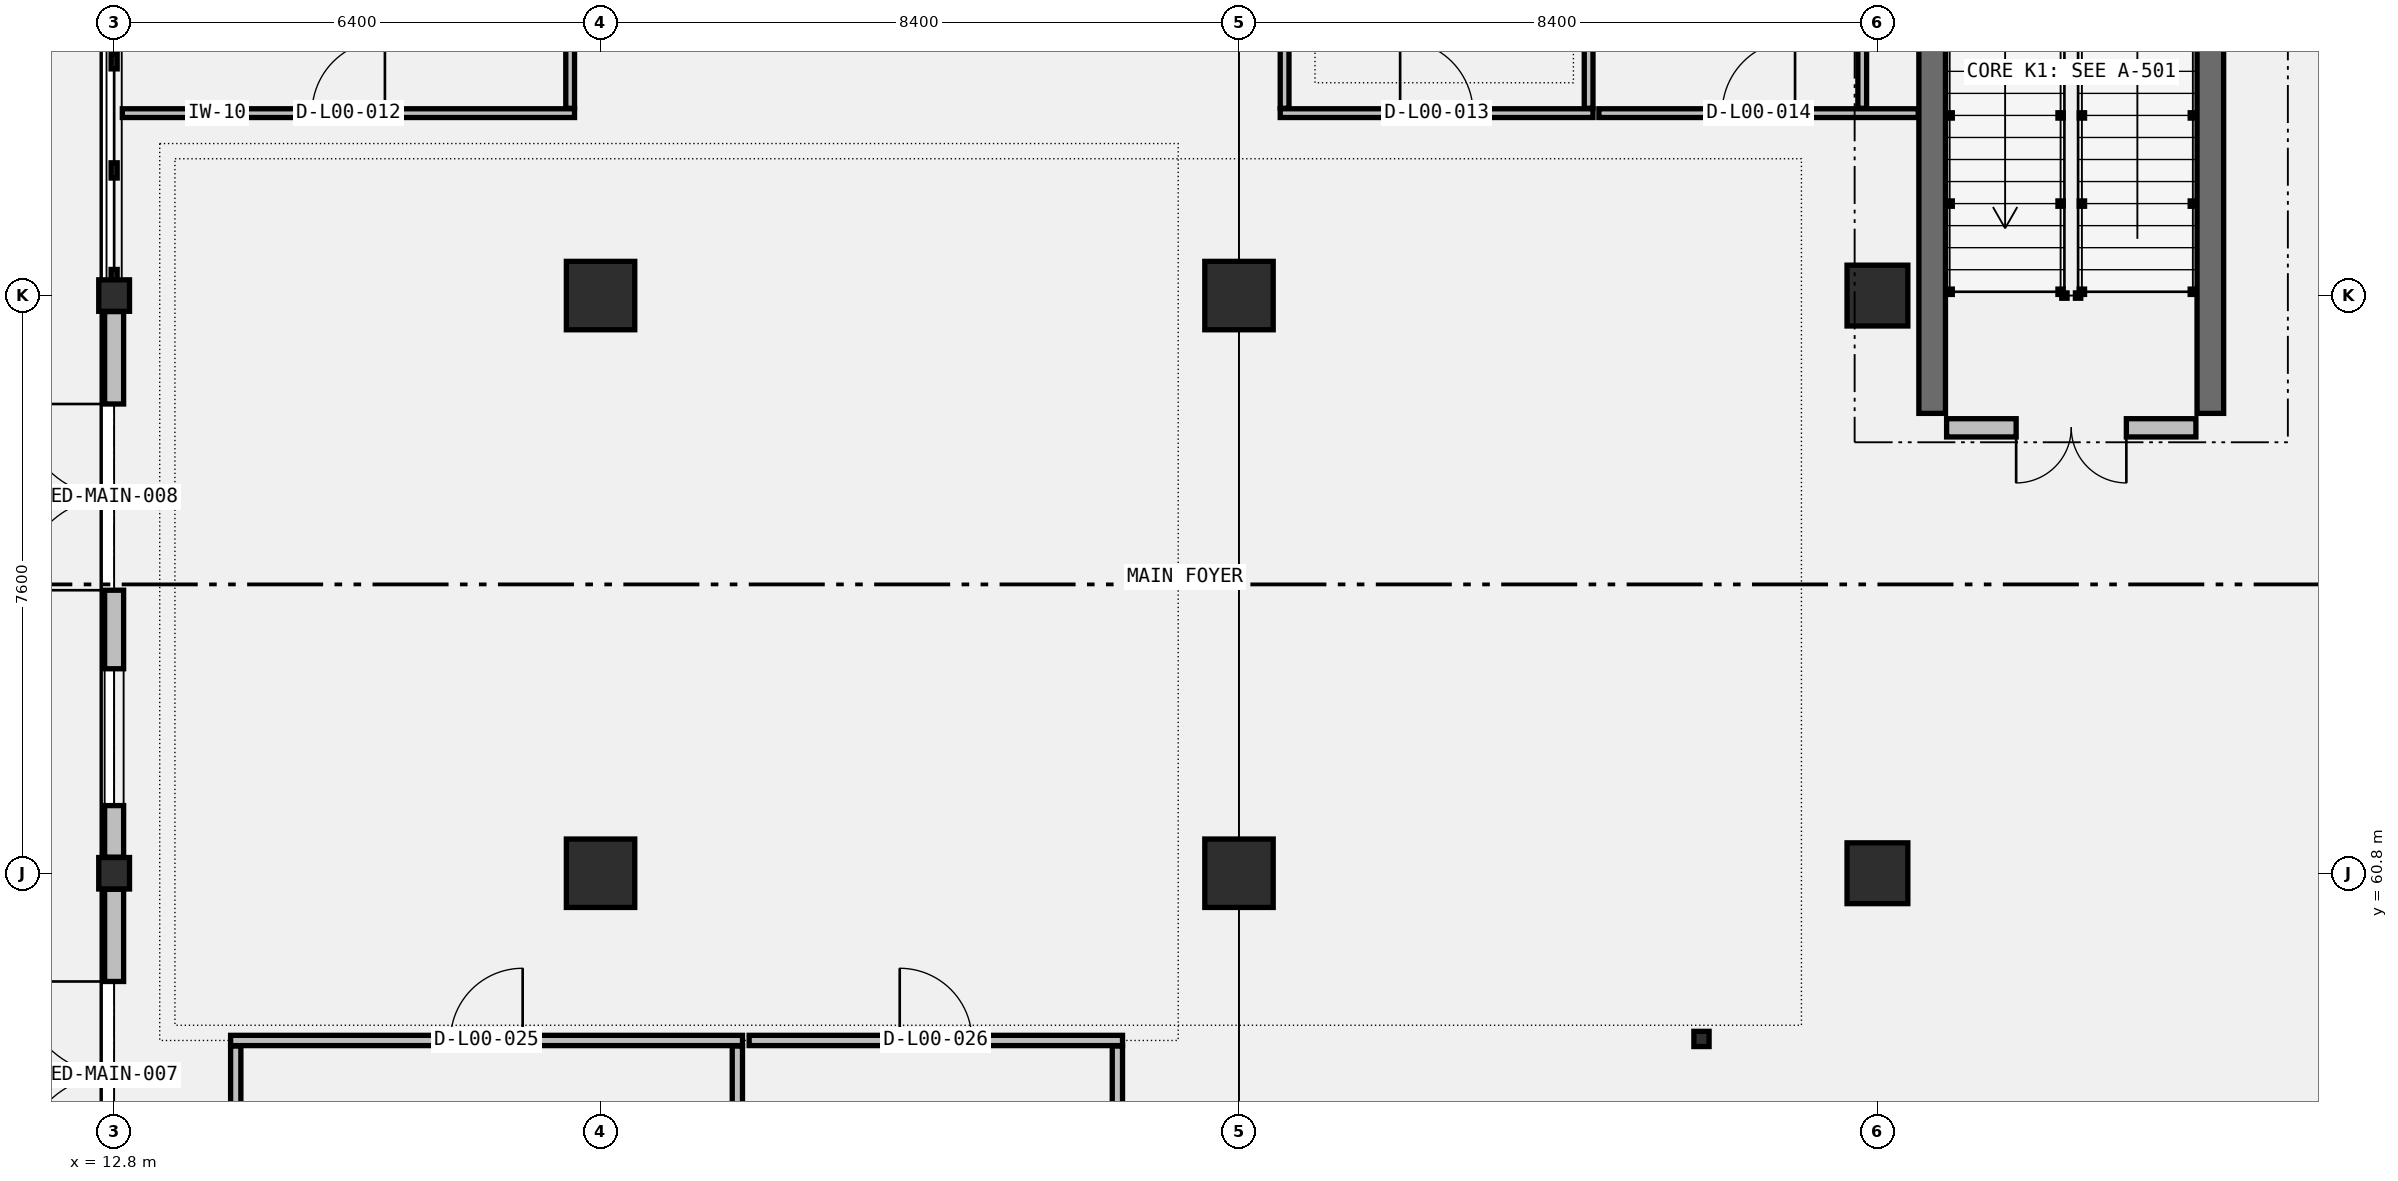
"""IFC4 building model, lengths in metres.
Left out: names, types, materials, properties, quantities, classifications, styles, units other than length and angle.
Written with IfcOpenShell. Run it as: python <this file> out.ifc"""

import sys

from ifc_helpers import new_model, si_unit, direction, frame, frame_2d, origin, origin_2d, place, context, subcontext, project, spatial, rectangle, circle, i_section, extrude, element, fill, save


model = new_model("IFC4")
c1 = context("Model", 3, precision=1e-05, world=origin(), true_north=direction((0.0, 1.0)))
c2 = subcontext(c1, "Body", "Model", "MODEL_VIEW")
j1 = project(units=[si_unit("LENGTHUNIT", "METRE"), si_unit("PLANEANGLEUNIT", "RADIAN")], contexts=[c1])
p1 = place(None, origin())
s1 = spatial("IfcSite", under=j1, at=p1, CompositionType="ELEMENT")
p2 = place(p1, origin())
s2 = spatial("IfcBuilding", under=s1, at=p2, CompositionType="ELEMENT")
p3 = place(p2, origin())
s3 = spatial("IfcBuildingStorey", under=s2, at=p3, CompositionType="ELEMENT", Elevation=0.0)
for number, where, z_axis, x_axis in (
    (1, (12.8, 60.8, -0.3), (0.0, 0.0, 1.0), (1.0, 0.0, 0.0)),
    (2, (12.8, 68.4, -0.3), (0.0, 0.0, 1.0), (1.0, 0.0, 0.0)),
):
    element("IfcColumn", number, at=place(p3, frame(where, z_axis=z_axis, x_axis=x_axis)), inside=s3, PredefinedType="COLUMN", context=c2, shape_type="SweptSolid", body=[
        extrude(i_section(OverallWidth=0.405, OverallDepth=0.414, WebThickness=0.018, FlangeThickness=0.028, FilletRadius=0.022, at=origin_2d()), origin(), (0.0, 0.0, 1.0), 5.7),
    ])
for number, where, z_axis, x_axis in (
    (3, (19.2, 60.8, -0.3), (0.0, 0.0, 1.0), (1.0, 0.0, 0.0)),
    (4, (19.2, 68.4, -0.3), (0.0, 0.0, 1.0), (1.0, 0.0, 0.0)),
    (5, (27.6, 60.8, -0.3), (0.0, 0.0, 1.0), (1.0, 0.0, 0.0)),
    (6, (27.6, 68.4, -0.3), (0.0, 0.0, 1.0), (1.0, 0.0, 0.0)),
):
    element("IfcColumn", number, at=place(p3, frame(where, z_axis=z_axis, x_axis=x_axis)), inside=s3, PredefinedType="COLUMN", context=c2, shape_type="SweptSolid", body=[
        extrude(circle(Radius=0.45, at=origin_2d()), origin(), (0.0, 0.0, 1.0), 5.7),
    ])
for number, where, z_axis, x_axis in (
    (7, (36.0, 60.8, -0.3), (0.0, 0.0, 1.0), (1.0, 0.0, 0.0)),
    (8, (36.0, 68.4, -0.3), (0.0, 0.0, 1.0), (1.0, 0.0, 0.0)),
):
    element("IfcColumn", number, at=place(p3, frame(where, z_axis=z_axis, x_axis=x_axis)), inside=s3, PredefinedType="COLUMN", context=c2, shape_type="SweptSolid", body=[
        extrude(circle(Radius=0.4, at=origin_2d()), origin(), (0.0, 0.0, 1.0), 5.7),
    ])
for number, where, z_axis, x_axis in (
    (9, (40.38, 66.85, -0.3), (0.0, 0.0, 1.0), (0.0, 1.0, 0.0)),
    (10, (36.72, 75.0, -0.3), (0.0, 0.0, 1.0), (0.0, -1.0, 0.0)),
):
    element("IfcWall", number, at=place(p3, frame(where, z_axis=z_axis, x_axis=x_axis)), inside=s3, PredefinedType="SHEAR", context=c2, shape_type="SweptSolid", body=[
        extrude(rectangle(XDim=8.15, YDim=0.35, at=frame_2d((4.075, 0.0))), origin(), (0.0, 0.0, 1.0), 5.46),
    ])
p4 = place(p3, frame((12.8, 53.418, 0.0), z_axis=(0.0, 0.0, 1.0), x_axis=(0.0, 1.0, 0.0)))
e11 = element("IfcWall", 11, at=p4, inside=s3, PredefinedType="STANDARD", context=c2, shape_type="SweptSolid", body=[
    extrude(rectangle(XDim=7.171, YDim=0.25, at=frame_2d((3.585, 0.0))), origin(), (0.0, 0.0, 1.0), 3.476),
])
p5 = place(p4, frame((0.677, 0.0, 0.8)))
e12 = element("IfcOpeningElement", 12, at=p5, cuts=e11, PredefinedType="OPENING", context=c2, shape_type="SweptSolid", body=[
    extrude(rectangle(XDim=1.8, YDim=2.4, at=frame_2d((0.9, 1.2))), frame((0.0, 0.135, 0.0), z_axis=(0.0, -1.0, 0.0), x_axis=(1.0, 0.0, 0.0)), (0.0, 0.0, 1.0), 0.27),
])
p6 = place(p4, frame((3.508, 0.0, 0.0)))
e13 = element("IfcOpeningElement", 13, at=p6, cuts=e11, PredefinedType="OPENING", context=c2, shape_type="SweptSolid", body=[
    extrude(rectangle(XDim=2.45, YDim=2.65, at=frame_2d((1.225, 1.325))), frame((0.0, 0.135, 0.0), z_axis=(0.0, -1.0, 0.0), x_axis=(1.0, 0.0, 0.0)), (0.0, 0.0, 1.0), 0.27),
])
p7 = place(p3, frame((12.8, 61.011, 0.0), z_axis=(0.0, 0.0, 1.0), x_axis=(0.0, 1.0, 0.0)))
e14 = element("IfcWall", 14, at=p7, inside=s3, PredefinedType="STANDARD", context=c2, shape_type="SweptSolid", body=[
    extrude(rectangle(XDim=7.178, YDim=0.25, at=frame_2d((3.589, 0.0))), origin(), (0.0, 0.0, 1.0), 3.476),
])
p8 = place(p7, frame((0.679, 0.0, 0.8)))
e15 = element("IfcOpeningElement", 15, at=p8, cuts=e14, PredefinedType="OPENING", context=c2, shape_type="SweptSolid", body=[
    extrude(rectangle(XDim=1.8, YDim=2.4, at=frame_2d((0.9, 1.2))), frame((0.0, 0.135, 0.0), z_axis=(0.0, -1.0, 0.0), x_axis=(1.0, 0.0, 0.0)), (0.0, 0.0, 1.0), 0.27),
])
p9 = place(p7, frame((3.512, 0.0, 0.0)))
e16 = element("IfcOpeningElement", 16, at=p9, cuts=e14, PredefinedType="OPENING", context=c2, shape_type="SweptSolid", body=[
    extrude(rectangle(XDim=2.45, YDim=2.65, at=frame_2d((1.225, 1.325))), frame((0.0, 0.135, 0.0), z_axis=(0.0, -1.0, 0.0), x_axis=(1.0, 0.0, 0.0)), (0.0, 0.0, 1.0), 0.27),
])
p10 = place(p3, frame((40.19, 66.66, 0.0), z_axis=(0.0, 0.0, 1.0), x_axis=(-1.0, 0.0, 0.0)))
e17 = element("IfcWall", 17, at=p10, inside=s3, PredefinedType="STANDARD", context=c2, shape_type="SweptSolid", body=[
    extrude(rectangle(XDim=3.28, YDim=0.24, at=frame_2d((1.64, 0.0))), origin(), (0.0, 0.0, 1.0), 5.16),
])
p11 = place(p10, frame((0.915, 0.0, 0.0)))
e18 = element("IfcOpeningElement", 18, at=p11, cuts=e17, PredefinedType="OPENING", context=c2, shape_type="SweptSolid", body=[
    extrude(rectangle(XDim=1.45, YDim=2.2, at=frame_2d((0.725, 1.1))), frame((0.0, 0.13, 0.0), z_axis=(0.0, -1.0, 0.0), x_axis=(1.0, 0.0, 0.0)), (0.0, 0.0, 1.0), 0.26),
])
p12 = place(p3, frame((33.685, 58.62, -0.3), z_axis=(0.0, 0.0, 1.0), x_axis=(1.0, 0.0, 0.0)))
e19 = element("IfcColumn", 19, at=p12, inside=s3, PredefinedType="COLUMN", context=c2, shape_type="SweptSolid", body=[
    extrude(i_section(OverallWidth=0.2, OverallDepth=0.2, WebThickness=0.008, FlangeThickness=0.012, FilletRadius=0.013, at=origin_2d()), origin(), (0.0, 0.0, 1.0), 5.7),
])
p13 = place(p3, frame((12.908, 70.8, 0.0), z_axis=(0.0, 0.0, 1.0), x_axis=(1.0, 0.0, 0.0)))
e20 = element("IfcWall", 20, at=p13, inside=s3, PredefinedType="PARTITIONING", context=c2, shape_type="SweptSolid", body=[
    extrude(rectangle(XDim=5.949, YDim=0.115, at=frame_2d((2.975, 0.0))), origin(), (0.0, 0.0, 1.0), 4.738),
])
p14 = place(p13, frame((2.495, 0.0, 0.0)))
e21 = element("IfcOpeningElement", 21, at=p14, cuts=e20, PredefinedType="OPENING", context=c2, shape_type="SweptSolid", body=[
    extrude(rectangle(XDim=0.96, YDim=2.08, at=frame_2d((0.48, 1.04))), frame((0.0, 0.067, 0.0), z_axis=(0.0, -1.0, 0.0), x_axis=(1.0, 0.0, 0.0)), (0.0, 0.0, 1.0), 0.135),
])
p15 = place(p3, frame((18.8, 70.864, 0.0), z_axis=(0.0, 0.0, 1.0), x_axis=(0.0, 1.0, 0.0)))
e22 = element("IfcWall", 22, at=p15, inside=s3, PredefinedType="PARTITIONING", context=c2, shape_type="SweptSolid", body=[
    extrude(rectangle(XDim=4.68, YDim=0.115, at=frame_2d((2.34, 0.0))), origin(), (0.0, 0.0, 1.0), 5.16),
])
p16 = place(p3, frame((28.143, 70.8, 0.0), z_axis=(0.0, 0.0, 1.0), x_axis=(1.0, 0.0, 0.0)))
e23 = element("IfcWall", 23, at=p16, inside=s3, PredefinedType="PARTITIONING", context=c2, shape_type="SweptSolid", body=[
    extrude(rectangle(XDim=4.115, YDim=0.115, at=frame_2d((2.058, 0.0))), origin(), (0.0, 0.0, 1.0), 4.738),
])
p17 = place(p16, frame((1.577, 0.0, 0.0)))
e24 = element("IfcOpeningElement", 24, at=p17, cuts=e23, PredefinedType="OPENING", context=c2, shape_type="SweptSolid", body=[
    extrude(rectangle(XDim=0.96, YDim=2.08, at=frame_2d((0.48, 1.04))), frame((0.0, 0.067, 0.0), z_axis=(0.0, -1.0, 0.0), x_axis=(1.0, 0.0, 0.0)), (0.0, 0.0, 1.0), 0.135),
])
for number, where, z_axis, x_axis in (
    (25, (28.2, 70.864, 0.0), (0.0, 0.0, 1.0), (0.0, 1.0, 0.0)),
    (26, (32.2, 70.864, 0.0), (0.0, 0.0, 1.0), (0.0, 1.0, 0.0)),
):
    element("IfcWall", number, at=place(p3, frame(where, z_axis=z_axis, x_axis=x_axis)), inside=s3, PredefinedType="PARTITIONING", context=c2, shape_type="SweptSolid", body=[
        extrude(rectangle(XDim=5.029, YDim=0.115, at=frame_2d((2.514, 0.0))), origin(), (0.0, 0.0, 1.0), 4.65),
    ])
p18 = place(p3, frame((32.335, 70.8, 0.0), z_axis=(0.0, 0.0, 1.0), x_axis=(1.0, 0.0, 0.0)))
e27 = element("IfcWall", 27, at=p18, inside=s3, PredefinedType="PARTITIONING", context=c2, shape_type="SweptSolid", body=[
    extrude(rectangle(XDim=4.202, YDim=0.115, at=frame_2d((2.101, 0.0))), origin(), (0.0, 0.0, 1.0), 4.738),
])
p19 = place(p18, frame((1.621, 0.0, 0.0)))
e28 = element("IfcOpeningElement", 28, at=p19, cuts=e27, PredefinedType="OPENING", context=c2, shape_type="SweptSolid", body=[
    extrude(rectangle(XDim=0.96, YDim=2.08, at=frame_2d((0.48, 1.04))), frame((0.0, 0.067, 0.0), z_axis=(0.0, -1.0, 0.0), x_axis=(1.0, 0.0, 0.0)), (0.0, 0.0, 1.0), 0.135),
])
p20 = place(p3, frame((35.8, 70.864, 0.0), z_axis=(0.0, 0.0, 1.0), x_axis=(0.0, 1.0, 0.0)))
e29 = element("IfcWall", 29, at=p20, inside=s3, PredefinedType="PARTITIONING", context=c2, shape_type="SweptSolid", body=[
    extrude(rectangle(XDim=4.73, YDim=0.115, at=frame_2d((2.365, 0.0))), origin(), (0.0, 0.0, 1.0), 4.748),
])
p21 = place(p3, frame((14.333, 58.6, 0.0), z_axis=(0.0, 0.0, 1.0), x_axis=(1.0, 0.0, 0.0)))
e30 = element("IfcWall", 30, at=p21, inside=s3, PredefinedType="PARTITIONING", context=c2, shape_type="SweptSolid", body=[
    extrude(rectangle(XDim=6.735, YDim=0.135, at=frame_2d((3.367, 0.0))), origin(), (0.0, 0.0, 1.0), 4.738),
])
p22 = place(p21, frame((2.893, 0.0, 0.0)))
e31 = element("IfcOpeningElement", 31, at=p22, cuts=e30, PredefinedType="OPENING", context=c2, shape_type="SweptSolid", body=[
    extrude(rectangle(XDim=0.95, YDim=2.12, at=frame_2d((0.475, 1.06))), frame((0.0, 0.077, 0.0), z_axis=(0.0, -1.0, 0.0), x_axis=(1.0, 0.0, 0.0)), (0.0, 0.0, 1.0), 0.155),
])
for number, where, z_axis, x_axis in (
    (32, (14.4, 53.973, 0.0), (0.0, 0.0, 1.0), (0.0, 1.0, 0.0)),
    (33, (21.0, 53.973, 0.0), (0.0, 0.0, 1.0), (0.0, 1.0, 0.0)),
):
    element("IfcWall", number, at=place(p3, frame(where, z_axis=z_axis, x_axis=x_axis)), inside=s3, PredefinedType="PARTITIONING", context=c2, shape_type="SweptSolid", body=[
        extrude(rectangle(XDim=4.553, YDim=0.135, at=frame_2d((2.277, 0.0))), origin(), (0.0, 0.0, 1.0), 5.16),
    ])
p23 = place(p3, frame((21.155, 58.6, 0.0), z_axis=(0.0, 0.0, 1.0), x_axis=(1.0, 0.0, 0.0)))
e34 = element("IfcWall", 34, at=p23, inside=s3, PredefinedType="PARTITIONING", context=c2, shape_type="SweptSolid", body=[
    extrude(rectangle(XDim=4.912, YDim=0.135, at=frame_2d((2.456, 0.0))), origin(), (0.0, 0.0, 1.0), 4.738),
])
p24 = place(p23, frame((1.981, 0.0, 0.0)))
e35 = element("IfcOpeningElement", 35, at=p24, cuts=e34, PredefinedType="OPENING", context=c2, shape_type="SweptSolid", body=[
    extrude(rectangle(XDim=0.95, YDim=2.12, at=frame_2d((0.475, 1.06))), frame((0.0, 0.077, 0.0), z_axis=(0.0, -1.0, 0.0), x_axis=(1.0, 0.0, 0.0)), (0.0, 0.0, 1.0), 0.155),
])
p25 = place(p3, frame((26.0, 53.973, 0.0), z_axis=(0.0, 0.0, 1.0), x_axis=(0.0, 1.0, 0.0)))
e36 = element("IfcWall", 36, at=p25, inside=s3, PredefinedType="PARTITIONING", context=c2, shape_type="SweptSolid", body=[
    extrude(rectangle(XDim=4.553, YDim=0.135, at=frame_2d((2.277, 0.0))), origin(), (0.0, 0.0, 1.0), 5.16),
])
p26 = place(p6, origin())
e37 = element("IfcDoor", 37, at=p26, inside=s3, OperationType="DOUBLE_DOOR_SINGLE_SWING", PredefinedType="DOOR", context=c2, shape_type="SweptSolid", body=[
    extrude(rectangle(XDim=2.45, YDim=2.65, at=frame_2d((1.225, 1.325))), frame((0.0, 0.025, 0.0), z_axis=(0.0, -1.0, 0.0), x_axis=(1.0, 0.0, 0.0)), (0.0, 0.0, 1.0), 0.05),
])
fill(e13, e37)
p27 = place(p8, origin())
e38 = element("IfcWindow", 38, at=p27, inside=s3, PartitioningType="DOUBLE_PANEL_VERTICAL", PredefinedType="WINDOW", context=c2, shape_type="SweptSolid", body=[
    extrude(rectangle(XDim=1.8, YDim=2.4, at=frame_2d((0.9, 1.2))), frame((0.0, 0.03, 0.0), z_axis=(0.0, -1.0, 0.0), x_axis=(1.0, 0.0, 0.0)), (0.0, 0.0, 1.0), 0.06),
])
fill(e15, e38)
p28 = place(p9, origin())
e39 = element("IfcDoor", 39, at=p28, inside=s3, OperationType="DOUBLE_DOOR_SINGLE_SWING", PredefinedType="DOOR", context=c2, shape_type="SweptSolid", body=[
    extrude(rectangle(XDim=2.45, YDim=2.65, at=frame_2d((1.225, 1.325))), frame((0.0, 0.025, 0.0), z_axis=(0.0, -1.0, 0.0), x_axis=(1.0, 0.0, 0.0)), (0.0, 0.0, 1.0), 0.05),
])
fill(e16, e39)
p29 = place(p11, origin())
e40 = element("IfcDoor", 40, at=p29, inside=s3, OperationType="DOUBLE_DOOR_SINGLE_SWING", PredefinedType="DOOR", context=c2, shape_type="SweptSolid", body=[
    extrude(rectangle(XDim=1.45, YDim=2.2, at=frame_2d((0.725, 1.1))), frame((0.0, 0.025, 0.0), z_axis=(0.0, -1.0, 0.0), x_axis=(1.0, 0.0, 0.0)), (0.0, 0.0, 1.0), 0.05),
])
fill(e18, e40)
p30 = place(p14, origin())
e41 = element("IfcDoor", 41, at=p30, inside=s3, OperationType="SINGLE_SWING_RIGHT", PredefinedType="DOOR", context=c2, shape_type="SweptSolid", body=[
    extrude(rectangle(XDim=0.96, YDim=2.08, at=frame_2d((0.48, 1.04))), frame((0.0, 0.025, 0.0), z_axis=(0.0, -1.0, 0.0), x_axis=(1.0, 0.0, 0.0)), (0.0, 0.0, 1.0), 0.05),
])
fill(e21, e41)
p31 = place(p17, origin())
e42 = element("IfcDoor", 42, at=p31, inside=s3, OperationType="SINGLE_SWING_LEFT", PredefinedType="DOOR", context=c2, shape_type="SweptSolid", body=[
    extrude(rectangle(XDim=0.96, YDim=2.08, at=frame_2d((0.48, 1.04))), frame((0.0, 0.025, 0.0), z_axis=(0.0, -1.0, 0.0), x_axis=(1.0, 0.0, 0.0)), (0.0, 0.0, 1.0), 0.05),
])
fill(e24, e42)
p32 = place(p19, origin())
e43 = element("IfcDoor", 43, at=p32, inside=s3, OperationType="SINGLE_SWING_RIGHT", PredefinedType="DOOR", context=c2, shape_type="SweptSolid", body=[
    extrude(rectangle(XDim=0.96, YDim=2.08, at=frame_2d((0.48, 1.04))), frame((0.0, 0.025, 0.0), z_axis=(0.0, -1.0, 0.0), x_axis=(1.0, 0.0, 0.0)), (0.0, 0.0, 1.0), 0.05),
])
fill(e28, e43)
p33 = place(p22, origin())
e44 = element("IfcDoor", 44, at=p33, inside=s3, OperationType="SINGLE_SWING_RIGHT", PredefinedType="DOOR", context=c2, shape_type="SweptSolid", body=[
    extrude(rectangle(XDim=0.95, YDim=2.12, at=frame_2d((0.475, 1.06))), frame((0.0, 0.025, 0.0), z_axis=(0.0, -1.0, 0.0), x_axis=(1.0, 0.0, 0.0)), (0.0, 0.0, 1.0), 0.05),
])
fill(e31, e44)
p34 = place(p24, origin())
e45 = element("IfcDoor", 45, at=p34, inside=s3, OperationType="SINGLE_SWING_LEFT", PredefinedType="DOOR", context=c2, shape_type="SweptSolid", body=[
    extrude(rectangle(XDim=0.95, YDim=2.12, at=frame_2d((0.475, 1.06))), frame((0.0, 0.025, 0.0), z_axis=(0.0, -1.0, 0.0), x_axis=(1.0, 0.0, 0.0)), (0.0, 0.0, 1.0), 0.05),
])
fill(e35, e45)
save(model, sys.argv[1])
